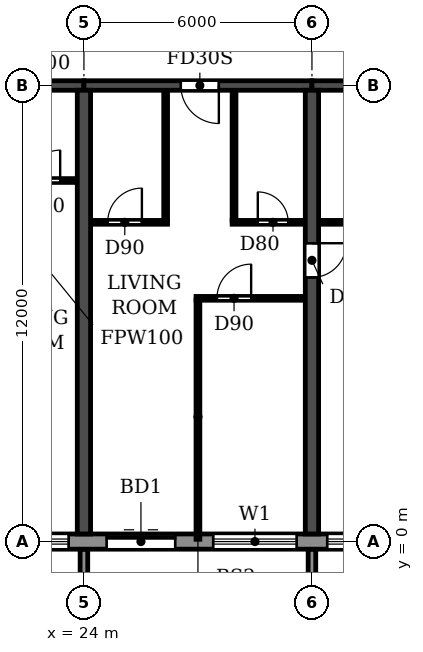
"""IFC4 building model, lengths in metres.
Left out: names, types, materials, properties, quantities, classifications, styles, units other than length and angle.
Written with IfcOpenShell. Run it as: python <this file> out.ifc"""

import sys

from ifc_helpers import new_model, si_unit, direction, frame, frame_2d, origin, place, context, subcontext, project, spatial, polyline, rectangle, outline, extrude, source, transform, mapped, element, fill, save


model = new_model("IFC4")
c1 = context("Model", 3, precision=1e-05, world=origin(), true_north=direction((0.0, 1.0)))
c2 = subcontext(c1, "Body", "Model", "MODEL_VIEW")
j1 = project(units=[si_unit("LENGTHUNIT", "METRE"), si_unit("PLANEANGLEUNIT", "RADIAN")], contexts=[c1])
p1 = place(None, origin())
s1 = spatial("IfcSite", under=j1, at=p1, CompositionType="ELEMENT")
p2 = place(p1, origin())
s2 = spatial("IfcBuilding", under=s1, at=p2, CompositionType="ELEMENT")
p3 = place(p2, frame((0.0, 0.0, 82.8)))
s3 = spatial("IfcBuildingStorey", under=s2, at=p3, CompositionType="ELEMENT", Elevation=82.8)
p4 = place(p3, frame((24.0, 0.2, 0.0), z_axis=(0.0, 0.0, 1.0), x_axis=(0.0, 1.0, 0.0)))
e1 = element("IfcWall", 1, at=p4, inside=s3, PredefinedType="SHEAR", context=c2, shape_type="SweptSolid", body=[
    extrude(rectangle(XDim=11.675, YDim=0.35, at=frame_2d((5.837, 0.0))), origin(), (0.0, 0.0, 1.0), 3.06),
])
p5 = place(p3, frame((30.0, 0.2, 0.0), z_axis=(0.0, 0.0, 1.0), x_axis=(0.0, 1.0, 0.0)))
e2 = element("IfcWall", 2, at=p5, inside=s3, PredefinedType="SHEAR", context=c2, shape_type="SweptSolid", body=[
    extrude(rectangle(XDim=11.675, YDim=0.35, at=frame_2d((5.837, 0.0))), origin(), (0.0, 0.0, 1.0), 3.06),
])
p6 = place(p5, frame((6.75, 0.0, 0.0)))
e3 = element("IfcOpeningElement", 3, at=p6, cuts=e2, PredefinedType="OPENING", context=c2, shape_type="SweptSolid", body=[
    extrude(rectangle(XDim=0.9, YDim=2.1, at=frame_2d((0.45, 1.05))), frame((0.0, 0.185, 0.0), z_axis=(0.0, -1.0, 0.0), x_axis=(1.0, 0.0, 0.0)), (0.0, 0.0, 1.0), 0.37),
])
p7 = place(p3, frame((18.0, 12.0, 0.0), z_axis=(0.0, 0.0, 1.0), x_axis=(1.0, 0.0, 0.0)))
e4 = element("IfcWall", 4, at=p7, inside=s3, PredefinedType="SHEAR", context=c2, shape_type="SweptSolid", body=[
    extrude(rectangle(XDim=6.0, YDim=0.25, at=frame_2d((3.0, 0.0))), origin(), (0.0, 0.0, 1.0), 2.46),
])
p8 = place(p7, frame((2.55, 0.0, 0.0)))
e5 = element("IfcOpeningElement", 5, at=p8, cuts=e4, PredefinedType="OPENING", context=c2, shape_type="SweptSolid", body=[
    extrude(rectangle(XDim=1.0, YDim=2.1, at=frame_2d((0.5, 1.05))), frame((0.0, 0.135, 0.0), z_axis=(0.0, -1.0, 0.0), x_axis=(1.0, 0.0, 0.0)), (0.0, 0.0, 1.0), 0.27),
])
p9 = place(p3, frame((24.0, 12.0, 0.0), z_axis=(0.0, 0.0, 1.0), x_axis=(1.0, 0.0, 0.0)))
e6 = element("IfcWall", 6, at=p9, inside=s3, PredefinedType="SHEAR", context=c2, shape_type="SweptSolid", body=[
    extrude(rectangle(XDim=6.0, YDim=0.25, at=frame_2d((3.0, 0.0))), origin(), (0.0, 0.0, 1.0), 2.46),
])
p10 = place(p9, frame((2.55, 0.0, 0.0)))
e7 = element("IfcOpeningElement", 7, at=p10, cuts=e6, PredefinedType="OPENING", context=c2, shape_type="SweptSolid", body=[
    extrude(rectangle(XDim=1.0, YDim=2.1, at=frame_2d((0.5, 1.05))), frame((0.0, 0.135, 0.0), z_axis=(0.0, -1.0, 0.0), x_axis=(1.0, 0.0, 0.0)), (0.0, 0.0, 1.0), 0.27),
])
p11 = place(p3, frame((30.0, 12.0, 0.0), z_axis=(0.0, 0.0, 1.0), x_axis=(1.0, 0.0, 0.0)))
e8 = element("IfcWall", 8, at=p11, inside=s3, PredefinedType="SHEAR", context=c2, shape_type="SweptSolid", body=[
    extrude(rectangle(XDim=6.0, YDim=0.25, at=frame_2d((3.0, 0.0))), origin(), (0.0, 0.0, 1.0), 2.46),
])
p12 = place(p3, frame((10.683, 0.0, 0.0), z_axis=(0.0, 0.0, 1.0), x_axis=(1.0, 0.0, 0.0)))
e9 = element("IfcWall", 9, at=p12, inside=s3, PredefinedType="STANDARD", context=c2, shape_type="SweptSolid", body=[
    extrude(rectangle(XDim=80.634, YDim=0.4, at=frame_2d((40.317, 0.0))), origin(), (0.0, 0.0, 1.0), 3.06),
])
p13 = place(p12, frame((1.717, 0.0, 0.9)))
e10 = element("IfcOpeningElement", 10, at=p13, cuts=e9, PredefinedType="OPENING", context=c2, shape_type="SweptSolid", body=[
    extrude(rectangle(XDim=2.2, YDim=1.5, at=frame_2d((1.1, 0.75))), frame((0.0, 0.21, 0.0), z_axis=(0.0, -1.0, 0.0), x_axis=(1.0, 0.0, 0.0)), (0.0, 0.0, 1.0), 0.42),
])
p14 = place(p12, frame((4.917, 0.0, 0.0)))
e11 = element("IfcOpeningElement", 11, at=p14, cuts=e9, PredefinedType="OPENING", context=c2, shape_type="SweptSolid", body=[
    extrude(rectangle(XDim=1.8, YDim=2.4, at=frame_2d((0.9, 1.2))), frame((0.0, 0.21, 0.0), z_axis=(0.0, -1.0, 0.0), x_axis=(1.0, 0.0, 0.0)), (0.0, 0.0, 1.0), 0.42),
])
p15 = place(p12, frame((7.717, 0.0, 0.9)))
e12 = element("IfcOpeningElement", 12, at=p15, cuts=e9, PredefinedType="OPENING", context=c2, shape_type="SweptSolid", body=[
    extrude(rectangle(XDim=2.2, YDim=1.5, at=frame_2d((1.1, 0.75))), frame((0.0, 0.21, 0.0), z_axis=(0.0, -1.0, 0.0), x_axis=(1.0, 0.0, 0.0)), (0.0, 0.0, 1.0), 0.42),
])
p16 = place(p12, frame((10.717, 0.0, 0.9)))
e13 = element("IfcOpeningElement", 13, at=p16, cuts=e9, PredefinedType="OPENING", context=c2, shape_type="SweptSolid", body=[
    extrude(rectangle(XDim=2.2, YDim=1.5, at=frame_2d((1.1, 0.75))), frame((0.0, 0.21, 0.0), z_axis=(0.0, -1.0, 0.0), x_axis=(1.0, 0.0, 0.0)), (0.0, 0.0, 1.0), 0.42),
])
p17 = place(p12, frame((13.917, 0.0, 0.0)))
e14 = element("IfcOpeningElement", 14, at=p17, cuts=e9, PredefinedType="OPENING", context=c2, shape_type="SweptSolid", body=[
    extrude(rectangle(XDim=1.8, YDim=2.4, at=frame_2d((0.9, 1.2))), frame((0.0, 0.21, 0.0), z_axis=(0.0, -1.0, 0.0), x_axis=(1.0, 0.0, 0.0)), (0.0, 0.0, 1.0), 0.42),
])
p18 = place(p12, frame((16.717, 0.0, 0.9)))
e15 = element("IfcOpeningElement", 15, at=p18, cuts=e9, PredefinedType="OPENING", context=c2, shape_type="SweptSolid", body=[
    extrude(rectangle(XDim=2.2, YDim=1.5, at=frame_2d((1.1, 0.75))), frame((0.0, 0.21, 0.0), z_axis=(0.0, -1.0, 0.0), x_axis=(1.0, 0.0, 0.0)), (0.0, 0.0, 1.0), 0.42),
])
p19 = place(p12, frame((19.717, 0.0, 0.9)))
e16 = element("IfcOpeningElement", 16, at=p19, cuts=e9, PredefinedType="OPENING", context=c2, shape_type="SweptSolid", body=[
    extrude(rectangle(XDim=2.2, YDim=1.5, at=frame_2d((1.1, 0.75))), frame((0.0, 0.21, 0.0), z_axis=(0.0, -1.0, 0.0), x_axis=(1.0, 0.0, 0.0)), (0.0, 0.0, 1.0), 0.42),
])
p20 = place(p12, frame((22.717, 0.0, 0.9)))
e17 = element("IfcOpeningElement", 17, at=p20, cuts=e9, PredefinedType="OPENING", context=c2, shape_type="SweptSolid", body=[
    extrude(rectangle(XDim=2.2, YDim=1.5, at=frame_2d((1.1, 0.75))), frame((0.0, 0.21, 0.0), z_axis=(0.0, -1.0, 0.0), x_axis=(1.0, 0.0, 0.0)), (0.0, 0.0, 1.0), 0.42),
])
p21 = place(p12, frame((25.917, 0.0, 0.0)))
e18 = element("IfcOpeningElement", 18, at=p21, cuts=e9, PredefinedType="OPENING", context=c2, shape_type="SweptSolid", body=[
    extrude(rectangle(XDim=1.8, YDim=2.4, at=frame_2d((0.9, 1.2))), frame((0.0, 0.21, 0.0), z_axis=(0.0, -1.0, 0.0), x_axis=(1.0, 0.0, 0.0)), (0.0, 0.0, 1.0), 0.42),
])
p22 = place(p12, frame((28.717, 0.0, 0.9)))
e19 = element("IfcOpeningElement", 19, at=p22, cuts=e9, PredefinedType="OPENING", context=c2, shape_type="SweptSolid", body=[
    extrude(rectangle(XDim=2.2, YDim=1.5, at=frame_2d((1.1, 0.75))), frame((0.0, 0.21, 0.0), z_axis=(0.0, -1.0, 0.0), x_axis=(1.0, 0.0, 0.0)), (0.0, 0.0, 1.0), 0.42),
])
p23 = place(p12, frame((31.717, 0.0, 0.9)))
e20 = element("IfcOpeningElement", 20, at=p23, cuts=e9, PredefinedType="OPENING", context=c2, shape_type="SweptSolid", body=[
    extrude(rectangle(XDim=2.2, YDim=1.5, at=frame_2d((1.1, 0.75))), frame((0.0, 0.21, 0.0), z_axis=(0.0, -1.0, 0.0), x_axis=(1.0, 0.0, 0.0)), (0.0, 0.0, 1.0), 0.42),
])
p24 = place(p12, frame((34.717, 0.0, 0.9)))
e21 = element("IfcOpeningElement", 21, at=p24, cuts=e9, PredefinedType="OPENING", context=c2, shape_type="SweptSolid", body=[
    extrude(rectangle(XDim=2.2, YDim=1.5, at=frame_2d((1.1, 0.75))), frame((0.0, 0.21, 0.0), z_axis=(0.0, -1.0, 0.0), x_axis=(1.0, 0.0, 0.0)), (0.0, 0.0, 1.0), 0.42),
])
p25 = place(p12, frame((37.717, 0.0, 0.9)))
e22 = element("IfcOpeningElement", 22, at=p25, cuts=e9, PredefinedType="OPENING", context=c2, shape_type="SweptSolid", body=[
    extrude(rectangle(XDim=2.2, YDim=1.5, at=frame_2d((1.1, 0.75))), frame((0.0, 0.21, 0.0), z_axis=(0.0, -1.0, 0.0), x_axis=(1.0, 0.0, 0.0)), (0.0, 0.0, 1.0), 0.42),
])
p26 = place(p12, frame((40.917, 0.0, 0.0)))
e23 = element("IfcOpeningElement", 23, at=p26, cuts=e9, PredefinedType="OPENING", context=c2, shape_type="SweptSolid", body=[
    extrude(rectangle(XDim=1.8, YDim=2.4, at=frame_2d((0.9, 1.2))), frame((0.0, 0.21, 0.0), z_axis=(0.0, -1.0, 0.0), x_axis=(1.0, 0.0, 0.0)), (0.0, 0.0, 1.0), 0.42),
])
p27 = place(p12, frame((43.717, 0.0, 0.9)))
e24 = element("IfcOpeningElement", 24, at=p27, cuts=e9, PredefinedType="OPENING", context=c2, shape_type="SweptSolid", body=[
    extrude(rectangle(XDim=2.2, YDim=1.5, at=frame_2d((1.1, 0.75))), frame((0.0, 0.21, 0.0), z_axis=(0.0, -1.0, 0.0), x_axis=(1.0, 0.0, 0.0)), (0.0, 0.0, 1.0), 0.42),
])
p28 = place(p12, frame((46.717, 0.0, 0.9)))
e25 = element("IfcOpeningElement", 25, at=p28, cuts=e9, PredefinedType="OPENING", context=c2, shape_type="SweptSolid", body=[
    extrude(rectangle(XDim=2.2, YDim=1.5, at=frame_2d((1.1, 0.75))), frame((0.0, 0.21, 0.0), z_axis=(0.0, -1.0, 0.0), x_axis=(1.0, 0.0, 0.0)), (0.0, 0.0, 1.0), 0.42),
])
p29 = place(p12, frame((49.717, 0.0, 0.9)))
e26 = element("IfcOpeningElement", 26, at=p29, cuts=e9, PredefinedType="OPENING", context=c2, shape_type="SweptSolid", body=[
    extrude(rectangle(XDim=2.2, YDim=1.5, at=frame_2d((1.1, 0.75))), frame((0.0, 0.21, 0.0), z_axis=(0.0, -1.0, 0.0), x_axis=(1.0, 0.0, 0.0)), (0.0, 0.0, 1.0), 0.42),
])
p30 = place(p12, frame((52.917, 0.0, 0.0)))
e27 = element("IfcOpeningElement", 27, at=p30, cuts=e9, PredefinedType="OPENING", context=c2, shape_type="SweptSolid", body=[
    extrude(rectangle(XDim=1.8, YDim=2.4, at=frame_2d((0.9, 1.2))), frame((0.0, 0.21, 0.0), z_axis=(0.0, -1.0, 0.0), x_axis=(1.0, 0.0, 0.0)), (0.0, 0.0, 1.0), 0.42),
])
p31 = place(p12, frame((55.717, 0.0, 0.9)))
e28 = element("IfcOpeningElement", 28, at=p31, cuts=e9, PredefinedType="OPENING", context=c2, shape_type="SweptSolid", body=[
    extrude(rectangle(XDim=2.2, YDim=1.5, at=frame_2d((1.1, 0.75))), frame((0.0, 0.21, 0.0), z_axis=(0.0, -1.0, 0.0), x_axis=(1.0, 0.0, 0.0)), (0.0, 0.0, 1.0), 0.42),
])
p32 = place(p12, frame((58.717, 0.0, 0.9)))
e29 = element("IfcOpeningElement", 29, at=p32, cuts=e9, PredefinedType="OPENING", context=c2, shape_type="SweptSolid", body=[
    extrude(rectangle(XDim=2.2, YDim=1.5, at=frame_2d((1.1, 0.75))), frame((0.0, 0.21, 0.0), z_axis=(0.0, -1.0, 0.0), x_axis=(1.0, 0.0, 0.0)), (0.0, 0.0, 1.0), 0.42),
])
p33 = place(p12, frame((61.717, 0.0, 0.9)))
e30 = element("IfcOpeningElement", 30, at=p33, cuts=e9, PredefinedType="OPENING", context=c2, shape_type="SweptSolid", body=[
    extrude(rectangle(XDim=2.2, YDim=1.5, at=frame_2d((1.1, 0.75))), frame((0.0, 0.21, 0.0), z_axis=(0.0, -1.0, 0.0), x_axis=(1.0, 0.0, 0.0)), (0.0, 0.0, 1.0), 0.42),
])
p34 = place(p12, frame((64.917, 0.0, 0.0)))
e31 = element("IfcOpeningElement", 31, at=p34, cuts=e9, PredefinedType="OPENING", context=c2, shape_type="SweptSolid", body=[
    extrude(rectangle(XDim=1.8, YDim=2.4, at=frame_2d((0.9, 1.2))), frame((0.0, 0.21, 0.0), z_axis=(0.0, -1.0, 0.0), x_axis=(1.0, 0.0, 0.0)), (0.0, 0.0, 1.0), 0.42),
])
p35 = place(p12, frame((67.717, 0.0, 0.9)))
e32 = element("IfcOpeningElement", 32, at=p35, cuts=e9, PredefinedType="OPENING", context=c2, shape_type="SweptSolid", body=[
    extrude(rectangle(XDim=2.2, YDim=1.5, at=frame_2d((1.1, 0.75))), frame((0.0, 0.21, 0.0), z_axis=(0.0, -1.0, 0.0), x_axis=(1.0, 0.0, 0.0)), (0.0, 0.0, 1.0), 0.42),
])
p36 = place(p12, frame((70.717, 0.0, 0.9)))
e33 = element("IfcOpeningElement", 33, at=p36, cuts=e9, PredefinedType="OPENING", context=c2, shape_type="SweptSolid", body=[
    extrude(rectangle(XDim=2.2, YDim=1.5, at=frame_2d((1.1, 0.75))), frame((0.0, 0.21, 0.0), z_axis=(0.0, -1.0, 0.0), x_axis=(1.0, 0.0, 0.0)), (0.0, 0.0, 1.0), 0.42),
])
p37 = place(p12, frame((73.917, 0.0, 0.0)))
e34 = element("IfcOpeningElement", 34, at=p37, cuts=e9, PredefinedType="OPENING", context=c2, shape_type="SweptSolid", body=[
    extrude(rectangle(XDim=1.8, YDim=2.4, at=frame_2d((0.9, 1.2))), frame((0.0, 0.21, 0.0), z_axis=(0.0, -1.0, 0.0), x_axis=(1.0, 0.0, 0.0)), (0.0, 0.0, 1.0), 0.42),
])
p38 = place(p12, frame((76.717, 0.0, 0.9)))
e35 = element("IfcOpeningElement", 35, at=p38, cuts=e9, PredefinedType="OPENING", context=c2, shape_type="SweptSolid", body=[
    extrude(rectangle(XDim=2.2, YDim=1.5, at=frame_2d((1.1, 0.75))), frame((0.0, 0.21, 0.0), z_axis=(0.0, -1.0, 0.0), x_axis=(1.0, 0.0, 0.0)), (0.0, 0.0, 1.0), 0.42),
])
m1 = source(origin(), c2, "Body", "SweptSolid", [
    extrude(outline(polyline([(0.0, 0.0), (0.2, 0.0), (0.2, 1.65), (0.0, 1.65), (0.0, 0.0)])), origin(), (0.0, 0.0, 1.0), 3.1),
])
for number, where in (
    (36, (23.9, -1.85, 0.0)),
    (37, (29.9, -1.85, 0.0)),
):
    element("IfcWall", number, at=place(p3, frame(where)), inside=s3, PredefinedType="STANDARD", context=c2, shape_type="MappedRepresentation", body=[
        mapped(m1, transform((0.0, 0.0, 0.0))),
    ])
p39 = place(p3, frame((26.95, 6.4, 0.0), z_axis=(0.0, 0.0, 1.0), x_axis=(1.0, 0.0, 0.0)))
e38 = element("IfcWall", 38, at=p39, inside=s3, PredefinedType="PARTITIONING", context=c2, shape_type="SweptSolid", body=[
    extrude(rectangle(XDim=2.865, YDim=0.1, at=frame_2d((1.433, 0.0))), origin(), (0.0, 0.0, 1.0), 3.06),
])
p40 = place(p39, frame((0.55, 0.0, 0.0)))
e39 = element("IfcOpeningElement", 39, at=p40, cuts=e38, PredefinedType="OPENING", context=c2, shape_type="SweptSolid", body=[
    extrude(rectangle(XDim=0.9, YDim=2.1, at=frame_2d((0.45, 1.05))), frame((0.0, 0.06, 0.0), z_axis=(0.0, -1.0, 0.0), x_axis=(1.0, 0.0, 0.0)), (0.0, 0.0, 1.0), 0.12),
])
p41 = place(p3, frame((24.185, 8.4, 0.0), z_axis=(0.0, 0.0, 1.0), x_axis=(1.0, 0.0, 0.0)))
e40 = element("IfcWall", 40, at=p41, inside=s3, PredefinedType="PARTITIONING", context=c2, shape_type="SweptSolid", body=[
    extrude(rectangle(XDim=2.015, YDim=0.1, at=frame_2d((1.007, 0.0))), origin(), (0.0, 0.0, 1.0), 3.06),
])
p42 = place(p41, frame((0.44, 0.0, 0.0)))
e41 = element("IfcOpeningElement", 41, at=p42, cuts=e40, PredefinedType="OPENING", context=c2, shape_type="SweptSolid", body=[
    extrude(rectangle(XDim=0.9, YDim=2.1, at=frame_2d((0.45, 1.05))), frame((0.0, 0.06, 0.0), z_axis=(0.0, -1.0, 0.0), x_axis=(1.0, 0.0, 0.0)), (0.0, 0.0, 1.0), 0.12),
])
p43 = place(p3, frame((27.9, 8.4, 0.0), z_axis=(0.0, 0.0, 1.0), x_axis=(1.0, 0.0, 0.0)))
e42 = element("IfcWall", 42, at=p43, inside=s3, PredefinedType="PARTITIONING", context=c2, shape_type="SweptSolid", body=[
    extrude(rectangle(XDim=1.915, YDim=0.1, at=frame_2d((0.958, 0.0))), origin(), (0.0, 0.0, 1.0), 3.06),
])
p44 = place(p43, frame((0.675, 0.0, 0.0)))
e43 = element("IfcOpeningElement", 43, at=p44, cuts=e42, PredefinedType="OPENING", context=c2, shape_type="SweptSolid", body=[
    extrude(rectangle(XDim=0.8, YDim=2.1, at=frame_2d((0.4, 1.05))), frame((0.0, 0.06, 0.0), z_axis=(0.0, -1.0, 0.0), x_axis=(1.0, 0.0, 0.0)), (0.0, 0.0, 1.0), 0.12),
])
p45 = place(p3, frame((30.185, 8.4, 0.0), z_axis=(0.0, 0.0, 1.0), x_axis=(1.0, 0.0, 0.0)))
e44 = element("IfcWall", 44, at=p45, inside=s3, PredefinedType="PARTITIONING", context=c2, shape_type="SweptSolid", body=[
    extrude(rectangle(XDim=2.715, YDim=0.1, at=frame_2d((1.357, 0.0))), origin(), (0.0, 0.0, 1.0), 3.06),
])
p46 = place(p45, frame((0.915, 0.0, 0.0)))
e45 = element("IfcOpeningElement", 45, at=p46, cuts=e44, PredefinedType="OPENING", context=c2, shape_type="SweptSolid", body=[
    extrude(rectangle(XDim=0.8, YDim=2.1, at=frame_2d((0.4, 1.05))), frame((0.0, 0.06, 0.0), z_axis=(0.0, -1.0, 0.0), x_axis=(1.0, 0.0, 0.0)), (0.0, 0.0, 1.0), 0.12),
])
p47 = place(p3, frame((21.9, 9.5, 0.0), z_axis=(0.0, 0.0, 1.0), x_axis=(1.0, 0.0, 0.0)))
e46 = element("IfcWall", 46, at=p47, inside=s3, PredefinedType="PARTITIONING", context=c2, shape_type="SweptSolid", body=[
    extrude(rectangle(XDim=1.915, YDim=0.1, at=frame_2d((0.958, 0.0))), origin(), (0.0, 0.0, 1.0), 3.06),
])
p48 = place(p47, frame((0.675, 0.0, 0.0)))
e47 = element("IfcOpeningElement", 47, at=p48, cuts=e46, PredefinedType="OPENING", context=c2, shape_type="SweptSolid", body=[
    extrude(rectangle(XDim=0.8, YDim=2.1, at=frame_2d((0.4, 1.05))), frame((0.0, 0.06, 0.0), z_axis=(0.0, -1.0, 0.0), x_axis=(1.0, 0.0, 0.0)), (0.0, 0.0, 1.0), 0.12),
])
p49 = place(p3, frame((26.15, 8.45, 0.0), z_axis=(0.0, 0.0, 1.0), x_axis=(0.0, 1.0, 0.0)))
e48 = element("IfcWall", 48, at=p49, inside=s3, PredefinedType="PARTITIONING", context=c2, shape_type="SweptSolid", body=[
    extrude(rectangle(XDim=3.415, YDim=0.1, at=frame_2d((1.708, 0.0))), origin(), (0.0, 0.0, 1.0), 3.06),
])
p50 = place(p3, frame((27.0, 0.06, 0.0), z_axis=(0.0, 0.0, 1.0), x_axis=(0.0, 1.0, 0.0)))
e49 = element("IfcWall", 49, at=p50, inside=s3, PredefinedType="PARTITIONING", context=c2, shape_type="SweptSolid", body=[
    extrude(rectangle(XDim=6.29, YDim=0.1, at=frame_2d((3.145, 0.0))), origin(), (0.0, 0.0, 1.0), 3.06),
])
p51 = place(p3, frame((27.95, 8.45, 0.0), z_axis=(0.0, 0.0, 1.0), x_axis=(0.0, 1.0, 0.0)))
e50 = element("IfcWall", 50, at=p51, inside=s3, PredefinedType="PARTITIONING", context=c2, shape_type="SweptSolid", body=[
    extrude(rectangle(XDim=3.415, YDim=0.1, at=frame_2d((1.708, 0.0))), origin(), (0.0, 0.0, 1.0), 3.06),
])
p52 = place(p16, origin())
e51 = element("IfcWindow", 51, at=p52, inside=s3, PartitioningType="DOUBLE_PANEL_HORIZONTAL", PredefinedType="WINDOW", context=c2, shape_type="SweptSolid", body=[
    extrude(rectangle(XDim=2.2, YDim=1.5, at=frame_2d((1.1, 0.75))), frame((0.0, 0.03, 0.0), z_axis=(0.0, -1.0, 0.0), x_axis=(1.0, 0.0, 0.0)), (0.0, 0.0, 1.0), 0.06),
])
fill(e13, e51)
p53 = place(p17, origin())
e52 = element("IfcDoor", 52, at=p53, inside=s3, OperationType="DOUBLE_DOOR_SLIDING", PredefinedType="DOOR", context=c2, shape_type="SweptSolid", body=[
    extrude(rectangle(XDim=1.8, YDim=2.4, at=frame_2d((0.9, 1.2))), frame((0.0, 0.025, 0.0), z_axis=(0.0, -1.0, 0.0), x_axis=(1.0, 0.0, 0.0)), (0.0, 0.0, 1.0), 0.05),
])
fill(e14, e52)
p54 = place(p18, origin())
e53 = element("IfcWindow", 53, at=p54, inside=s3, PartitioningType="DOUBLE_PANEL_HORIZONTAL", PredefinedType="WINDOW", context=c2, shape_type="SweptSolid", body=[
    extrude(rectangle(XDim=2.2, YDim=1.5, at=frame_2d((1.1, 0.75))), frame((0.0, 0.03, 0.0), z_axis=(0.0, -1.0, 0.0), x_axis=(1.0, 0.0, 0.0)), (0.0, 0.0, 1.0), 0.06),
])
fill(e15, e53)
p55 = place(p19, origin())
e54 = element("IfcWindow", 54, at=p55, inside=s3, PartitioningType="DOUBLE_PANEL_HORIZONTAL", PredefinedType="WINDOW", context=c2, shape_type="SweptSolid", body=[
    extrude(rectangle(XDim=2.2, YDim=1.5, at=frame_2d((1.1, 0.75))), frame((0.0, 0.03, 0.0), z_axis=(0.0, -1.0, 0.0), x_axis=(1.0, 0.0, 0.0)), (0.0, 0.0, 1.0), 0.06),
])
fill(e16, e54)
p56 = place(p48, origin())
e55 = element("IfcDoor", 55, at=p56, inside=s3, OperationType="SINGLE_SWING_RIGHT", PredefinedType="DOOR", context=c2, shape_type="SweptSolid", body=[
    extrude(rectangle(XDim=0.8, YDim=2.1, at=frame_2d((0.4, 1.05))), frame((0.0, 0.025, 0.0), z_axis=(0.0, -1.0, 0.0), x_axis=(1.0, 0.0, 0.0)), (0.0, 0.0, 1.0), 0.05),
])
fill(e47, e55)
p57 = place(p42, origin())
e56 = element("IfcDoor", 56, at=p57, inside=s3, OperationType="SINGLE_SWING_RIGHT", PredefinedType="DOOR", context=c2, shape_type="SweptSolid", body=[
    extrude(rectangle(XDim=0.9, YDim=2.1, at=frame_2d((0.45, 1.05))), frame((0.0, 0.025, 0.0), z_axis=(0.0, -1.0, 0.0), x_axis=(1.0, 0.0, 0.0)), (0.0, 0.0, 1.0), 0.05),
])
fill(e41, e56)
p58 = place(p10, frame((1.0, 0.0, 0.0), z_axis=(0.0, 0.0, 1.0), x_axis=(-1.0, 0.0, 0.0)))
e57 = element("IfcDoor", 57, at=p58, inside=s3, OperationType="SINGLE_SWING_LEFT", PredefinedType="DOOR", context=c2, shape_type="SweptSolid", body=[
    extrude(rectangle(XDim=1.0, YDim=2.1, at=frame_2d((0.5, 1.05))), frame((0.0, 0.025, 0.0), z_axis=(0.0, -1.0, 0.0), x_axis=(1.0, 0.0, 0.0)), (0.0, 0.0, 1.0), 0.05),
])
fill(e7, e57)
p59 = place(p40, origin())
e58 = element("IfcDoor", 58, at=p59, inside=s3, OperationType="SINGLE_SWING_RIGHT", PredefinedType="DOOR", context=c2, shape_type="SweptSolid", body=[
    extrude(rectangle(XDim=0.9, YDim=2.1, at=frame_2d((0.45, 1.05))), frame((0.0, 0.025, 0.0), z_axis=(0.0, -1.0, 0.0), x_axis=(1.0, 0.0, 0.0)), (0.0, 0.0, 1.0), 0.05),
])
fill(e39, e58)
p60 = place(p44, origin())
e59 = element("IfcDoor", 59, at=p60, inside=s3, OperationType="SINGLE_SWING_LEFT", PredefinedType="DOOR", context=c2, shape_type="SweptSolid", body=[
    extrude(rectangle(XDim=0.8, YDim=2.1, at=frame_2d((0.4, 1.05))), frame((0.0, 0.025, 0.0), z_axis=(0.0, -1.0, 0.0), x_axis=(1.0, 0.0, 0.0)), (0.0, 0.0, 1.0), 0.05),
])
fill(e43, e59)
p61 = place(p6, frame((0.9, 0.0, 0.0), z_axis=(0.0, 0.0, 1.0), x_axis=(-1.0, 0.0, 0.0)))
e60 = element("IfcDoor", 60, at=p61, inside=s3, OperationType="SINGLE_SWING_LEFT", PredefinedType="DOOR", context=c2, shape_type="SweptSolid", body=[
    extrude(rectangle(XDim=0.9, YDim=2.1, at=frame_2d((0.45, 1.05))), frame((0.0, 0.025, 0.0), z_axis=(0.0, -1.0, 0.0), x_axis=(1.0, 0.0, 0.0)), (0.0, 0.0, 1.0), 0.05),
])
fill(e3, e60)
save(model, sys.argv[1])
